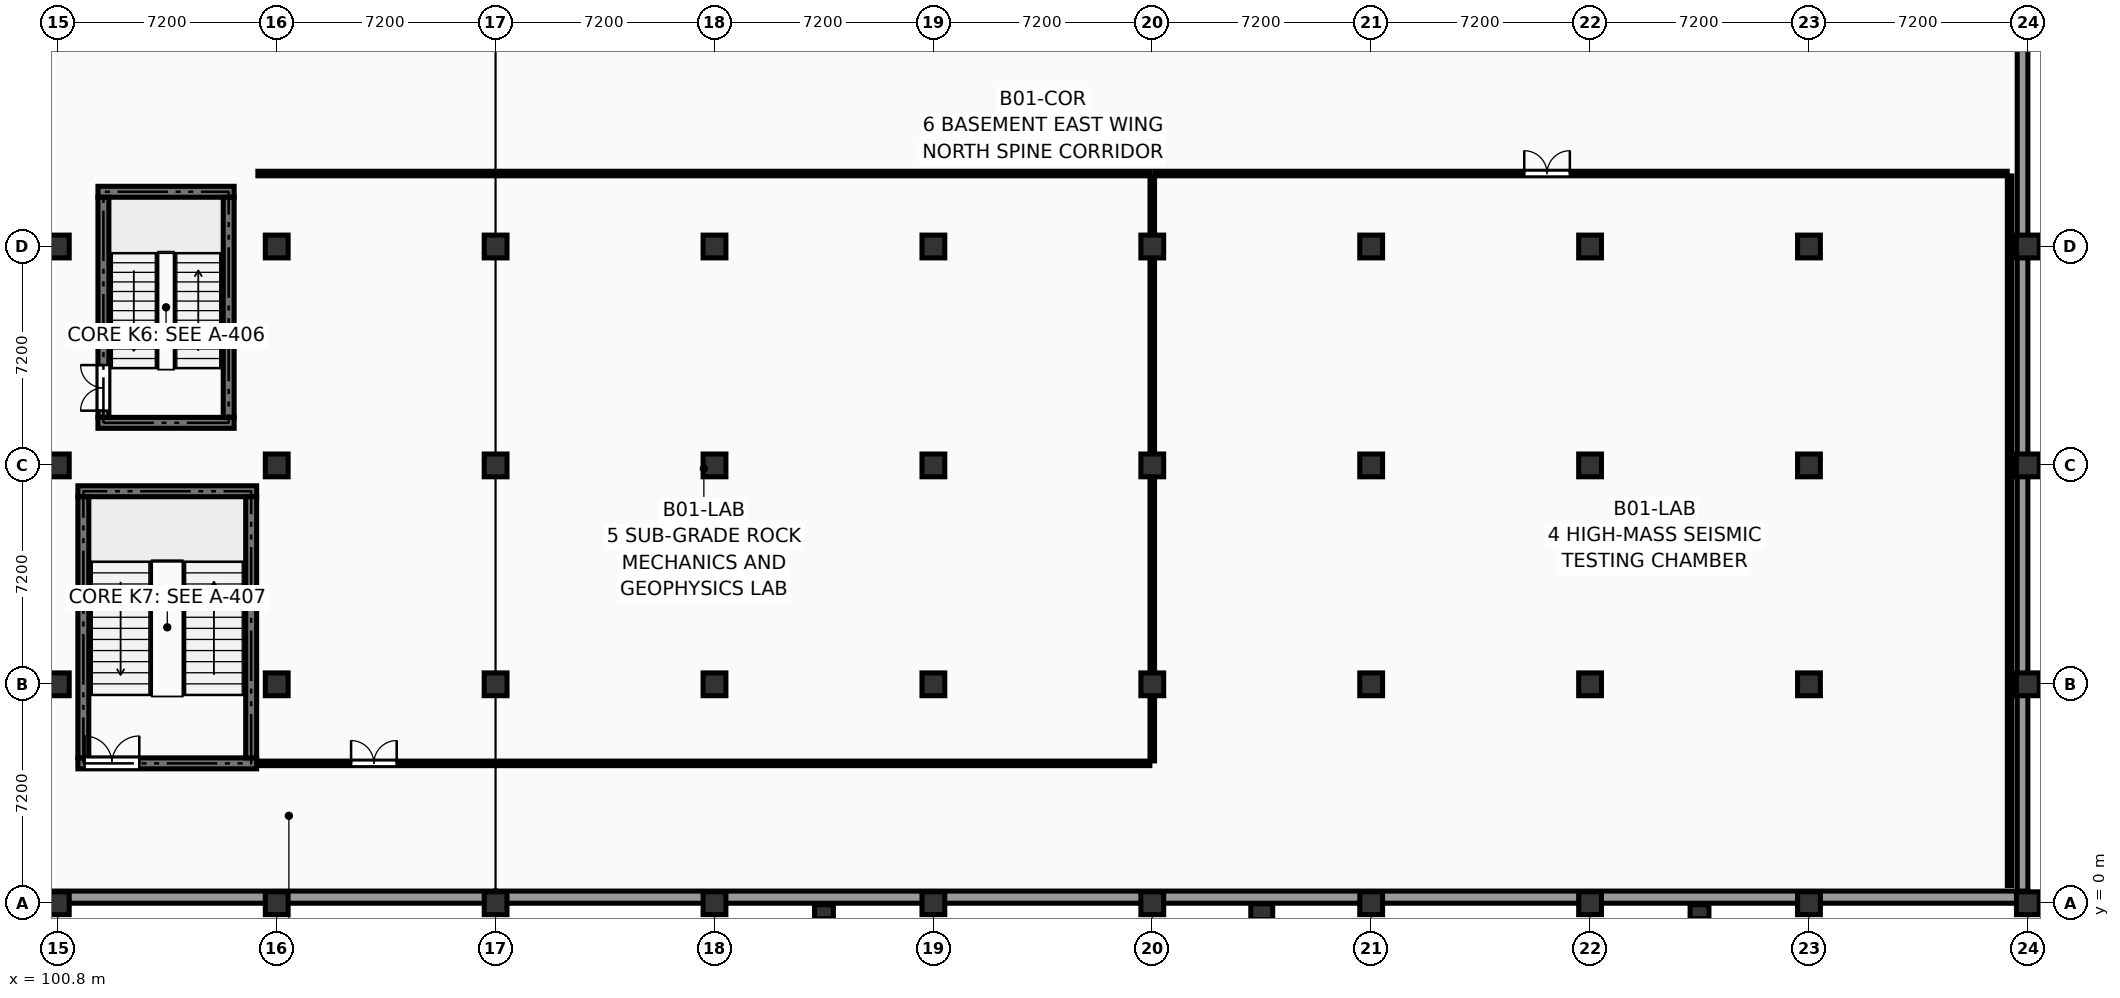
"""IFC4 building model, lengths in metres.
Left out: names, types, materials, properties, quantities, classifications, styles, units other than length and angle.
Written with IfcOpenShell. Run it as: python <this file> out.ifc"""

import sys

from ifc_helpers import new_model, si_unit, direction, frame, frame_2d, origin, origin_2d, place, context, subcontext, project, spatial, rectangle, extrude, element, fill, save


model = new_model("IFC4")
c1 = context("Model", 3, precision=1e-05, world=origin(), true_north=direction((0.0, 1.0)))
c2 = subcontext(c1, "Body", "Model", "MODEL_VIEW")
j1 = project(units=[si_unit("LENGTHUNIT", "METRE"), si_unit("PLANEANGLEUNIT", "RADIAN")], contexts=[c1])
p1 = place(None, origin())
s1 = spatial("IfcSite", under=j1, at=p1, CompositionType="ELEMENT")
p2 = place(p1, origin())
s2 = spatial("IfcBuilding", under=s1, at=p2, CompositionType="ELEMENT")
p3 = place(p2, frame((0.0, 0.0, -4.5)))
s3 = spatial("IfcBuildingStorey", under=s2, at=p3, CompositionType="ELEMENT", Elevation=-4.5)
p4 = place(p3, frame((100.8, 0.0, -0.3), z_axis=(0.0, 0.0, 1.0), x_axis=(1.0, 0.0, 0.0)))
e1 = element("IfcColumn", 1, at=p4, inside=s3, PredefinedType="COLUMN", context=c2, shape_type="SweptSolid", body=[
    extrude(rectangle(XDim=0.75, YDim=0.75, at=origin_2d()), origin(), (0.0, 0.0, 1.0), 4.8),
])
for number, where, z_axis, x_axis in (
    (2, (100.8, 7.2, 0.0), (0.0, 0.0, 1.0), (1.0, 0.0, 0.0)),
    (3, (100.8, 14.4, 0.0), (0.0, 0.0, 1.0), (1.0, 0.0, 0.0)),
    (4, (100.8, 21.6, 0.0), (0.0, 0.0, 1.0), (1.0, 0.0, 0.0)),
):
    element("IfcColumn", number, at=place(p3, frame(where, z_axis=z_axis, x_axis=x_axis)), inside=s3, PredefinedType="COLUMN", context=c2, shape_type="SweptSolid", body=[
        extrude(rectangle(XDim=0.75, YDim=0.75, at=origin_2d()), origin(), (0.0, 0.0, 1.0), 4.5),
    ])
p5 = place(p3, frame((108.0, 0.0, -0.3), z_axis=(0.0, 0.0, 1.0), x_axis=(1.0, 0.0, 0.0)))
e5 = element("IfcColumn", 5, at=p5, inside=s3, PredefinedType="COLUMN", context=c2, shape_type="SweptSolid", body=[
    extrude(rectangle(XDim=0.75, YDim=0.75, at=origin_2d()), origin(), (0.0, 0.0, 1.0), 4.8),
])
for number, where, z_axis, x_axis in (
    (6, (108.0, 7.2, 0.0), (0.0, 0.0, 1.0), (1.0, 0.0, 0.0)),
    (7, (108.0, 14.4, 0.0), (0.0, 0.0, 1.0), (1.0, 0.0, 0.0)),
    (8, (108.0, 21.6, 0.0), (0.0, 0.0, 1.0), (1.0, 0.0, 0.0)),
):
    element("IfcColumn", number, at=place(p3, frame(where, z_axis=z_axis, x_axis=x_axis)), inside=s3, PredefinedType="COLUMN", context=c2, shape_type="SweptSolid", body=[
        extrude(rectangle(XDim=0.75, YDim=0.75, at=origin_2d()), origin(), (0.0, 0.0, 1.0), 4.5),
    ])
for number, where, z_axis, x_axis in (
    (9, (115.2, 0.0, -0.3), (0.0, 0.0, 1.0), (1.0, 0.0, 0.0)),
    (10, (115.2, 7.2, -0.3), (0.0, 0.0, 1.0), (1.0, 0.0, 0.0)),
    (11, (115.2, 14.4, -0.3), (0.0, 0.0, 1.0), (1.0, 0.0, 0.0)),
    (12, (115.2, 21.6, -0.3), (0.0, 0.0, 1.0), (1.0, 0.0, 0.0)),
):
    element("IfcColumn", number, at=place(p3, frame(where, z_axis=z_axis, x_axis=x_axis)), inside=s3, PredefinedType="COLUMN", context=c2, shape_type="SweptSolid", body=[
        extrude(rectangle(XDim=0.75, YDim=0.75, at=origin_2d()), origin(), (0.0, 0.0, 1.0), 4.8),
    ])
for number, where, z_axis, x_axis in (
    (13, (122.4, 0.0, -0.28), (0.0, 0.0, 1.0), (1.0, 0.0, 0.0)),
    (14, (122.4, 7.2, -0.28), (0.0, 0.0, 1.0), (1.0, 0.0, 0.0)),
    (15, (122.4, 14.4, -0.28), (0.0, 0.0, 1.0), (1.0, 0.0, 0.0)),
    (16, (122.4, 21.6, -0.28), (0.0, 0.0, 1.0), (1.0, 0.0, 0.0)),
    (17, (129.6, 0.0, -0.28), (0.0, 0.0, 1.0), (1.0, 0.0, 0.0)),
    (18, (129.6, 7.2, -0.28), (0.0, 0.0, 1.0), (1.0, 0.0, 0.0)),
    (19, (129.6, 14.4, -0.28), (0.0, 0.0, 1.0), (1.0, 0.0, 0.0)),
    (20, (129.6, 21.6, -0.28), (0.0, 0.0, 1.0), (1.0, 0.0, 0.0)),
    (21, (136.8, 0.0, -0.28), (0.0, 0.0, 1.0), (1.0, 0.0, 0.0)),
    (22, (136.8, 7.2, -0.28), (0.0, 0.0, 1.0), (1.0, 0.0, 0.0)),
    (23, (136.8, 14.4, -0.28), (0.0, 0.0, 1.0), (1.0, 0.0, 0.0)),
    (24, (136.8, 21.6, -0.28), (0.0, 0.0, 1.0), (1.0, 0.0, 0.0)),
    (25, (144.0, 0.0, -0.28), (0.0, 0.0, 1.0), (1.0, 0.0, 0.0)),
    (26, (144.0, 7.2, -0.28), (0.0, 0.0, 1.0), (1.0, 0.0, 0.0)),
    (27, (144.0, 14.4, -0.28), (0.0, 0.0, 1.0), (1.0, 0.0, 0.0)),
    (28, (144.0, 21.6, -0.28), (0.0, 0.0, 1.0), (1.0, 0.0, 0.0)),
    (29, (151.2, 0.0, -0.28), (0.0, 0.0, 1.0), (1.0, 0.0, 0.0)),
    (30, (151.2, 7.2, -0.28), (0.0, 0.0, 1.0), (1.0, 0.0, 0.0)),
    (31, (151.2, 14.4, -0.28), (0.0, 0.0, 1.0), (1.0, 0.0, 0.0)),
    (32, (151.2, 21.6, -0.28), (0.0, 0.0, 1.0), (1.0, 0.0, 0.0)),
    (33, (158.4, 0.0, -0.28), (0.0, 0.0, 1.0), (1.0, 0.0, 0.0)),
    (34, (158.4, 7.2, -0.28), (0.0, 0.0, 1.0), (1.0, 0.0, 0.0)),
    (35, (158.4, 14.4, -0.28), (0.0, 0.0, 1.0), (1.0, 0.0, 0.0)),
    (36, (158.4, 21.6, -0.28), (0.0, 0.0, 1.0), (1.0, 0.0, 0.0)),
    (37, (165.6, 0.0, -0.28), (0.0, 0.0, 1.0), (1.0, 0.0, 0.0)),
    (38, (165.6, 7.2, -0.28), (0.0, 0.0, 1.0), (1.0, 0.0, 0.0)),
    (39, (165.6, 14.4, -0.28), (0.0, 0.0, 1.0), (1.0, 0.0, 0.0)),
    (40, (165.6, 21.6, -0.28), (0.0, 0.0, 1.0), (1.0, 0.0, 0.0)),
):
    element("IfcColumn", number, at=place(p3, frame(where, z_axis=z_axis, x_axis=x_axis)), inside=s3, PredefinedType="COLUMN", context=c2, shape_type="SweptSolid", body=[
        extrude(rectangle(XDim=0.75, YDim=0.75, at=origin_2d()), origin(), (0.0, 0.0, 1.0), 4.78),
    ])
p6 = place(p3, frame((126.0, -0.28, -0.28), z_axis=(0.0, 0.0, 1.0), x_axis=(0.0, 1.0, 0.0)))
e41 = element("IfcColumn", 41, at=p6, inside=s3, PredefinedType="PILASTER", context=c2, shape_type="SweptSolid", body=[
    extrude(rectangle(XDim=0.46, YDim=0.62, at=origin_2d()), origin(), (0.0, 0.0, 1.0), 4.78),
])
p7 = place(p3, frame((140.4, -0.28, -0.28), z_axis=(0.0, 0.0, 1.0), x_axis=(0.0, 1.0, 0.0)))
e42 = element("IfcColumn", 42, at=p7, inside=s3, PredefinedType="PILASTER", context=c2, shape_type="SweptSolid", body=[
    extrude(rectangle(XDim=0.52, YDim=0.72, at=origin_2d()), origin(), (0.0, 0.0, 1.0), 4.78),
])
p8 = place(p3, frame((154.8, -0.28, -0.28), z_axis=(0.0, 0.0, 1.0), x_axis=(0.0, 1.0, 0.0)))
e43 = element("IfcColumn", 43, at=p8, inside=s3, PredefinedType="PILASTER", context=c2, shape_type="SweptSolid", body=[
    extrude(rectangle(XDim=0.46, YDim=0.62, at=origin_2d()), origin(), (0.0, 0.0, 1.0), 4.78),
])
p9 = place(p3, frame((165.425, 28.8, -0.3), z_axis=(0.0, 0.0, 1.0), x_axis=(0.0, -1.0, 0.0)))
e44 = element("IfcWall", 44, at=p9, inside=s3, PredefinedType="USERDEFINED", context=c2, shape_type="SweptSolid", body=[
    extrude(rectangle(XDim=28.8, YDim=0.35, at=frame_2d((14.4, 0.0))), origin(), (0.0, 0.0, 1.0), 4.54),
])
p10 = place(p3, frame((165.6, 0.2, -0.3), z_axis=(0.0, 0.0, 1.0), x_axis=(-1.0, 0.0, 0.0)))
e45 = element("IfcWall", 45, at=p10, inside=s3, PredefinedType="USERDEFINED", context=c2, shape_type="SweptSolid", body=[
    extrude(rectangle(XDim=50.4, YDim=0.4, at=frame_2d((25.2, 0.0))), origin(), (0.0, 0.0, 1.0), 4.54),
])
p11 = place(p3, frame((115.2, 0.2, -0.3), z_axis=(0.0, 0.0, 1.0), x_axis=(-1.0, 0.0, 0.0)))
e46 = element("IfcWall", 46, at=p11, inside=s3, PredefinedType="USERDEFINED", context=c2, shape_type="SweptSolid", body=[
    extrude(rectangle(XDim=50.4, YDim=0.4, at=frame_2d((25.2, 0.0))), origin(), (0.0, 0.0, 1.0), 4.54),
])
for number, where, z_axis, x_axis in (
    (47, (102.12, 15.8, -0.3), (0.0, 0.0, 1.0), (1.0, 0.0, 0.0)),
    (48, (102.12, 23.4, -0.3), (0.0, 0.0, 1.0), (1.0, 0.0, 0.0)),
):
    element("IfcWall", number, at=place(p3, frame(where, z_axis=z_axis, x_axis=x_axis)), inside=s3, PredefinedType="SHEAR", context=c2, shape_type="SweptSolid", body=[
        extrude(rectangle(XDim=4.48, YDim=0.36, at=frame_2d((2.24, 0.0))), origin(), (0.0, 0.0, 1.0), 4.54),
    ])
p12 = place(p3, frame((102.3, 15.98, -0.3), z_axis=(0.0, 0.0, 1.0), x_axis=(0.0, 1.0, 0.0)))
e49 = element("IfcWall", 49, at=p12, inside=s3, PredefinedType="SHEAR", context=c2, shape_type="SweptSolid", body=[
    extrude(rectangle(XDim=7.24, YDim=0.36, at=frame_2d((3.62, 0.0))), origin(), (0.0, 0.0, 1.0), 4.54),
])
p13 = place(p12, frame((0.22, 0.0, 0.3)))
e50 = element("IfcOpeningElement", 50, at=p13, cuts=e49, PredefinedType="OPENING", context=c2, shape_type="SweptSolid", body=[
    extrude(rectangle(XDim=1.5, YDim=2.2, at=frame_2d((0.75, 1.1))), frame((0.0, 0.192, 0.0), z_axis=(0.0, -1.0, 0.0), x_axis=(1.0, 0.0, 0.0)), (0.0, 0.0, 1.0), 0.384),
])
p14 = place(p3, frame((106.42, 15.98, -0.3), z_axis=(0.0, 0.0, 1.0), x_axis=(0.0, 1.0, 0.0)))
e51 = element("IfcWall", 51, at=p14, inside=s3, PredefinedType="SHEAR", context=c2, shape_type="SweptSolid", body=[
    extrude(rectangle(XDim=7.24, YDim=0.36, at=frame_2d((3.62, 0.0))), origin(), (0.0, 0.0, 1.0), 4.54),
])
p15 = place(p3, frame((101.46, 4.6, -0.3), z_axis=(0.0, 0.0, 1.0), x_axis=(1.0, 0.0, 0.0)))
e52 = element("IfcWall", 52, at=p15, inside=s3, PredefinedType="SHEAR", context=c2, shape_type="SweptSolid", body=[
    extrude(rectangle(XDim=5.88, YDim=0.36, at=frame_2d((2.94, 0.0))), origin(), (0.0, 0.0, 1.0), 4.54),
])
p16 = place(p15, frame((0.22, 0.0, 0.3)))
e53 = element("IfcOpeningElement", 53, at=p16, cuts=e52, PredefinedType="OPENING", context=c2, shape_type="SweptSolid", body=[
    extrude(rectangle(XDim=1.8, YDim=2.2, at=frame_2d((0.9, 1.1))), frame((0.0, 0.192, 0.0), z_axis=(0.0, -1.0, 0.0), x_axis=(1.0, 0.0, 0.0)), (0.0, 0.0, 1.0), 0.384),
])
p17 = place(p3, frame((101.46, 13.55, -0.3), z_axis=(0.0, 0.0, 1.0), x_axis=(1.0, 0.0, 0.0)))
e54 = element("IfcWall", 54, at=p17, inside=s3, PredefinedType="SHEAR", context=c2, shape_type="SweptSolid", body=[
    extrude(rectangle(XDim=5.88, YDim=0.36, at=frame_2d((2.94, 0.0))), origin(), (0.0, 0.0, 1.0), 4.54),
])
for number, where, z_axis, x_axis in (
    (55, (101.64, 4.78, -0.3), (0.0, 0.0, 1.0), (0.0, 1.0, 0.0)),
    (56, (107.16, 4.78, -0.3), (0.0, 0.0, 1.0), (0.0, 1.0, 0.0)),
):
    element("IfcWall", number, at=place(p3, frame(where, z_axis=z_axis, x_axis=x_axis)), inside=s3, PredefinedType="SHEAR", context=c2, shape_type="SweptSolid", body=[
        extrude(rectangle(XDim=8.59, YDim=0.36, at=frame_2d((4.295, 0.0))), origin(), (0.0, 0.0, 1.0), 4.54),
    ])
p18 = place(p3, frame((107.38, 4.6, 0.0), z_axis=(0.0, 0.0, 1.0), x_axis=(1.0, 0.0, 0.0)))
e57 = element("IfcWall", 57, at=p18, inside=s3, PredefinedType="PARTITIONING", context=c2, shape_type="SweptSolid", body=[
    extrude(rectangle(XDim=29.34, YDim=0.15, at=frame_2d((14.67, 0.0))), origin(), (0.0, 0.0, 1.0), 4.225),
])
p19 = place(p18, frame((3.066, 0.0, 0.0)))
e58 = element("IfcOpeningElement", 58, at=p19, cuts=e57, PredefinedType="OPENING", context=c2, shape_type="SweptSolid", body=[
    extrude(rectangle(XDim=1.5, YDim=2.2, at=frame_2d((0.75, 1.1))), frame((0.0, 0.087, 0.0), z_axis=(0.0, -1.0, 0.0), x_axis=(1.0, 0.0, 0.0)), (0.0, 0.0, 1.0), 0.174),
])
p20 = place(p3, frame((136.8, 4.68, 0.0), z_axis=(0.0, 0.0, 1.0), x_axis=(0.0, 1.0, 0.0)))
e59 = element("IfcWall", 59, at=p20, inside=s3, PredefinedType="PARTITIONING", context=c2, shape_type="SweptSolid", body=[
    extrude(rectangle(XDim=19.24, YDim=0.15, at=frame_2d((9.62, 0.0))), origin(), (0.0, 0.0, 1.0), 3.375),
])
p21 = place(p3, frame((107.38, 24.0, 0.0), z_axis=(0.0, 0.0, 1.0), x_axis=(1.0, 0.0, 0.0)))
e60 = element("IfcWall", 60, at=p21, inside=s3, PredefinedType="PARTITIONING", context=c2, shape_type="SweptSolid", body=[
    extrude(rectangle(XDim=29.34, YDim=0.15, at=frame_2d((14.67, 0.0))), origin(), (0.0, 0.0, 1.0), 4.225),
])
p22 = place(p3, frame((165.0, 0.58, 0.0), z_axis=(0.0, 0.0, 1.0), x_axis=(0.0, 1.0, 0.0)))
e61 = element("IfcWall", 61, at=p22, inside=s3, PredefinedType="PARTITIONING", context=c2, shape_type="SweptSolid", body=[
    extrude(rectangle(XDim=23.34, YDim=0.15, at=frame_2d((11.67, 0.0))), origin(), (0.0, 0.0, 1.0), 4.225),
])
p23 = place(p3, frame((136.88, 24.0, 0.0), z_axis=(0.0, 0.0, 1.0), x_axis=(1.0, 0.0, 0.0)))
e62 = element("IfcWall", 62, at=p23, inside=s3, PredefinedType="PARTITIONING", context=c2, shape_type="SweptSolid", body=[
    extrude(rectangle(XDim=28.04, YDim=0.15, at=frame_2d((14.02, 0.0))), origin(), (0.0, 0.0, 1.0), 4.225),
])
p24 = place(p23, frame((12.155, 0.0, 0.0)))
e63 = element("IfcOpeningElement", 63, at=p24, cuts=e62, PredefinedType="OPENING", context=c2, shape_type="SweptSolid", body=[
    extrude(rectangle(XDim=1.5, YDim=2.2, at=frame_2d((0.75, 1.1))), frame((0.0, 0.087, 0.0), z_axis=(0.0, -1.0, 0.0), x_axis=(1.0, 0.0, 0.0)), (0.0, 0.0, 1.0), 0.174),
])
p25 = place(p13, origin())
e64 = element("IfcDoor", 64, at=p25, inside=s3, OperationType="DOUBLE_DOOR_SINGLE_SWING", PredefinedType="DOOR", context=c2, shape_type="SweptSolid", body=[
    extrude(rectangle(XDim=1.5, YDim=2.2, at=frame_2d((0.75, 1.1))), frame((0.0, 0.025, 0.0), z_axis=(0.0, -1.0, 0.0), x_axis=(1.0, 0.0, 0.0)), (0.0, 0.0, 1.0), 0.05),
])
fill(e50, e64)
p26 = place(p16, origin())
e65 = element("IfcDoor", 65, at=p26, inside=s3, OperationType="DOUBLE_DOOR_SINGLE_SWING", PredefinedType="DOOR", context=c2, shape_type="SweptSolid", body=[
    extrude(rectangle(XDim=1.8, YDim=2.2, at=frame_2d((0.9, 1.1))), frame((0.0, 0.025, 0.0), z_axis=(0.0, -1.0, 0.0), x_axis=(1.0, 0.0, 0.0)), (0.0, 0.0, 1.0), 0.05),
])
fill(e53, e65)
p27 = place(p19, origin())
e66 = element("IfcDoor", 66, at=p27, inside=s3, OperationType="DOUBLE_DOOR_SINGLE_SWING", PredefinedType="DOOR", context=c2, shape_type="SweptSolid", body=[
    extrude(rectangle(XDim=1.5, YDim=2.2, at=frame_2d((0.75, 1.1))), frame((0.0, 0.025, 0.0), z_axis=(0.0, -1.0, 0.0), x_axis=(1.0, 0.0, 0.0)), (0.0, 0.0, 1.0), 0.05),
])
fill(e58, e66)
p28 = place(p24, origin())
e67 = element("IfcDoor", 67, at=p28, inside=s3, OperationType="DOUBLE_DOOR_SINGLE_SWING", PredefinedType="DOOR", context=c2, shape_type="SweptSolid", body=[
    extrude(rectangle(XDim=1.5, YDim=2.2, at=frame_2d((0.75, 1.1))), frame((0.0, 0.025, 0.0), z_axis=(0.0, -1.0, 0.0), x_axis=(1.0, 0.0, 0.0)), (0.0, 0.0, 1.0), 0.05),
])
fill(e63, e67)
save(model, sys.argv[1])
